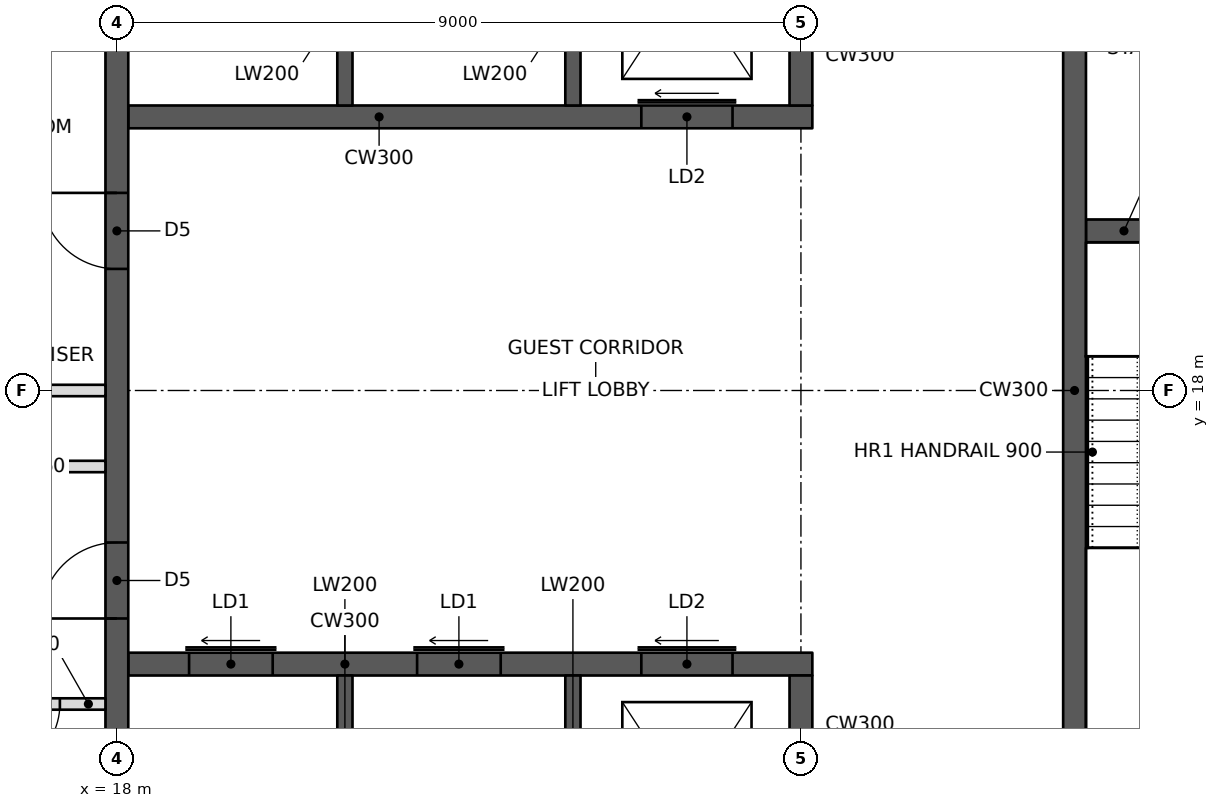
"""IFC4 building model, lengths in metres.
Left out: names, types, materials, properties, quantities, classifications, styles, units other than length and angle.
Written with IfcOpenShell. Run it as: python <this file> out.ifc"""

import sys

from ifc_helpers import new_model, si_unit, direction, frame, frame_2d, origin, place, context, subcontext, project, spatial, rectangle, extrude, element, fill, save


model = new_model("IFC4")
c1 = context("Model", 3, precision=1e-05, world=origin(), true_north=direction((0.0, 1.0)))
c2 = subcontext(c1, "Body", "Model", "MODEL_VIEW")
j1 = project(units=[si_unit("LENGTHUNIT", "METRE"), si_unit("PLANEANGLEUNIT", "RADIAN")], contexts=[c1])
p1 = place(None, origin())
s1 = spatial("IfcSite", under=j1, at=p1, CompositionType="ELEMENT")
p2 = place(p1, origin())
s2 = spatial("IfcBuilding", under=s1, at=p2, CompositionType="ELEMENT")
p3 = place(p2, frame((0.0, 0.0, 51.8)))
s3 = spatial("IfcBuildingStorey", under=s2, at=p3, CompositionType="ELEMENT", Elevation=51.8)
p4 = place(p3, frame((18.0, 11.4, 0.0), z_axis=(0.0, 0.0, 1.0), x_axis=(0.0, 1.0, 0.0)))
e1 = element("IfcWall", 1, at=p4, inside=s3, PredefinedType="SHEAR", context=c2, shape_type="SweptSolid", body=[
    extrude(rectangle(XDim=13.2, YDim=0.3, at=frame_2d((6.6, 0.0))), origin(), (0.0, 0.0, 1.0), 3.4),
])
p5 = place(p4, frame((3.6, 0.0, 0.0)))
e2 = element("IfcOpeningElement", 2, at=p5, cuts=e1, PredefinedType="OPENING", context=c2, shape_type="SweptSolid", body=[
    extrude(rectangle(XDim=1.0, YDim=2.1, at=frame_2d((0.5, 1.05))), frame((0.0, 0.16, 0.0), z_axis=(0.0, -1.0, 0.0), x_axis=(1.0, 0.0, 0.0)), (0.0, 0.0, 1.0), 0.32),
])
p6 = place(p4, frame((8.2, 0.0, 0.0)))
e3 = element("IfcOpeningElement", 3, at=p6, cuts=e1, PredefinedType="OPENING", context=c2, shape_type="SweptSolid", body=[
    extrude(rectangle(XDim=1.0, YDim=2.1, at=frame_2d((0.5, 1.05))), frame((0.0, 0.16, 0.0), z_axis=(0.0, -1.0, 0.0), x_axis=(1.0, 0.0, 0.0)), (0.0, 0.0, 1.0), 0.32),
])
p7 = place(p3, frame((14.55, 18.0, 0.0), z_axis=(0.0, 0.0, 1.0), x_axis=(1.0, 0.0, 0.0)))
e4 = element("IfcWall", 4, at=p7, inside=s3, PredefinedType="PARTITIONING", context=c2, shape_type="SweptSolid", body=[
    extrude(rectangle(XDim=3.3, YDim=0.15, at=frame_2d((1.65, 0.0))), origin(), (0.0, 0.0, 1.0), 3.2),
])
p8 = place(p3, frame((18.15, 14.4, 0.0), z_axis=(0.0, 0.0, 1.0), x_axis=(1.0, 0.0, 0.0)))
e5 = element("IfcWall", 5, at=p8, inside=s3, PredefinedType="SHEAR", context=c2, shape_type="SweptSolid", body=[
    extrude(rectangle(XDim=9.0, YDim=0.3, at=frame_2d((4.5, 0.0))), origin(), (0.0, 0.0, 1.0), 3.4),
])
p9 = place(p8, frame((0.8, 0.0, 0.0)))
e6 = element("IfcOpeningElement", 6, at=p9, cuts=e5, PredefinedType="OPENING", context=c2, shape_type="SweptSolid", body=[
    extrude(rectangle(XDim=1.1, YDim=2.1, at=frame_2d((0.55, 1.05))), frame((0.0, 0.16, 0.0), z_axis=(0.0, -1.0, 0.0), x_axis=(1.0, 0.0, 0.0)), (0.0, 0.0, 1.0), 0.32),
])
p10 = place(p8, frame((3.8, 0.0, 0.0)))
e7 = element("IfcOpeningElement", 7, at=p10, cuts=e5, PredefinedType="OPENING", context=c2, shape_type="SweptSolid", body=[
    extrude(rectangle(XDim=1.1, YDim=2.1, at=frame_2d((0.55, 1.05))), frame((0.0, 0.16, 0.0), z_axis=(0.0, -1.0, 0.0), x_axis=(1.0, 0.0, 0.0)), (0.0, 0.0, 1.0), 0.32),
])
p11 = place(p8, frame((6.75, 0.0, 0.0)))
e8 = element("IfcOpeningElement", 8, at=p11, cuts=e5, PredefinedType="OPENING", context=c2, shape_type="SweptSolid", body=[
    extrude(rectangle(XDim=1.2, YDim=2.1, at=frame_2d((0.6, 1.05))), frame((0.0, 0.16, 0.0), z_axis=(0.0, -1.0, 0.0), x_axis=(1.0, 0.0, 0.0)), (0.0, 0.0, 1.0), 0.32),
])
p12 = place(p3, frame((27.0, 11.4, 0.0), z_axis=(0.0, 0.0, 1.0), x_axis=(0.0, 1.0, 0.0)))
e9 = element("IfcWall", 9, at=p12, inside=s3, PredefinedType="SHEAR", context=c2, shape_type="SweptSolid", body=[
    extrude(rectangle(XDim=2.85, YDim=0.3, at=frame_2d((1.425, 0.0))), origin(), (0.0, 0.0, 1.0), 3.4),
])
for number, where, z_axis, x_axis in (
    (10, (21.0, 11.4, 0.0), (0.0, 0.0, 1.0), (0.0, 1.0, 0.0)),
    (11, (24.0, 11.4, 0.0), (0.0, 0.0, 1.0), (0.0, 1.0, 0.0)),
):
    element("IfcWall", number, at=place(p3, frame(where, z_axis=z_axis, x_axis=x_axis)), inside=s3, PredefinedType="SHEAR", context=c2, shape_type="SweptSolid", body=[
        extrude(rectangle(XDim=2.85, YDim=0.2, at=frame_2d((1.425, 0.0))), origin(), (0.0, 0.0, 1.0), 3.4),
    ])
p13 = place(p3, frame((18.15, 21.6, 0.0), z_axis=(0.0, 0.0, 1.0), x_axis=(1.0, 0.0, 0.0)))
e12 = element("IfcWall", 12, at=p13, inside=s3, PredefinedType="SHEAR", context=c2, shape_type="SweptSolid", body=[
    extrude(rectangle(XDim=9.0, YDim=0.3, at=frame_2d((4.5, 0.0))), origin(), (0.0, 0.0, 1.0), 3.4),
])
p14 = place(p13, frame((6.75, 0.0, 0.0)))
e13 = element("IfcOpeningElement", 13, at=p14, cuts=e12, PredefinedType="OPENING", context=c2, shape_type="SweptSolid", body=[
    extrude(rectangle(XDim=1.2, YDim=2.1, at=frame_2d((0.6, 1.05))), frame((0.0, 0.16, 0.0), z_axis=(0.0, -1.0, 0.0), x_axis=(1.0, 0.0, 0.0)), (0.0, 0.0, 1.0), 0.32),
])
p15 = place(p3, frame((27.0, 21.75, 0.0), z_axis=(0.0, 0.0, 1.0), x_axis=(0.0, 1.0, 0.0)))
e14 = element("IfcWall", 14, at=p15, inside=s3, PredefinedType="SHEAR", context=c2, shape_type="SweptSolid", body=[
    extrude(rectangle(XDim=2.85, YDim=0.3, at=frame_2d((1.425, 0.0))), origin(), (0.0, 0.0, 1.0), 3.4),
])
for number, where, z_axis, x_axis in (
    (15, (21.0, 21.75, 0.0), (0.0, 0.0, 1.0), (0.0, 1.0, 0.0)),
    (16, (24.0, 21.75, 0.0), (0.0, 0.0, 1.0), (0.0, 1.0, 0.0)),
):
    element("IfcWall", number, at=place(p3, frame(where, z_axis=z_axis, x_axis=x_axis)), inside=s3, PredefinedType="SHEAR", context=c2, shape_type="SweptSolid", body=[
        extrude(rectangle(XDim=2.85, YDim=0.2, at=frame_2d((1.425, 0.0))), origin(), (0.0, 0.0, 1.0), 3.4),
    ])
p16 = place(p3, frame((30.6, 11.4, 0.0), z_axis=(0.0, 0.0, 1.0), x_axis=(0.0, 1.0, 0.0)))
e17 = element("IfcWall", 17, at=p16, inside=s3, PredefinedType="SHEAR", context=c2, shape_type="SweptSolid", body=[
    extrude(rectangle(XDim=13.2, YDim=0.3, at=frame_2d((6.6, 0.0))), origin(), (0.0, 0.0, 1.0), 3.4),
])
p17 = place(p3, frame((30.75, 20.1, 0.0), z_axis=(0.0, 0.0, 1.0), x_axis=(1.0, 0.0, 0.0)))
e18 = element("IfcWall", 18, at=p17, inside=s3, PredefinedType="SHEAR", context=c2, shape_type="SweptSolid", body=[
    extrude(rectangle(XDim=2.85, YDim=0.3, at=frame_2d((1.425, 0.0))), origin(), (0.0, 0.0, 1.0), 3.4),
])
p18 = place(p17, frame((1.15, 0.0, 0.0)))
e19 = element("IfcOpeningElement", 19, at=p18, cuts=e18, PredefinedType="OPENING", context=c2, shape_type="SweptSolid", body=[
    extrude(rectangle(XDim=1.0, YDim=2.1, at=frame_2d((0.5, 1.05))), frame((0.0, 0.16, 0.0), z_axis=(0.0, -1.0, 0.0), x_axis=(1.0, 0.0, 0.0)), (0.0, 0.0, 1.0), 0.32),
])
p19 = place(p3, frame((14.55, 17.0, 0.0), z_axis=(0.0, 0.0, 1.0), x_axis=(1.0, 0.0, 0.0)))
e20 = element("IfcWall", 20, at=p19, inside=s3, PredefinedType="PARTITIONING", context=c2, shape_type="SweptSolid", body=[
    extrude(rectangle(XDim=3.3, YDim=0.15, at=frame_2d((1.65, 0.0))), origin(), (0.0, 0.0, 1.0), 3.2),
])
p20 = place(p19, frame((0.3, 0.0, 0.0)))
e21 = element("IfcOpeningElement", 21, at=p20, cuts=e20, PredefinedType="OPENING", context=c2, shape_type="SweptSolid", body=[
    extrude(rectangle(XDim=1.0, YDim=2.1, at=frame_2d((0.5, 1.05))), frame((0.0, 0.085, 0.0), z_axis=(0.0, -1.0, 0.0), x_axis=(1.0, 0.0, 0.0)), (0.0, 0.0, 1.0), 0.17),
])
p21 = place(p3, frame((14.55, 13.875, 0.0), z_axis=(0.0, 0.0, 1.0), x_axis=(1.0, 0.0, 0.0)))
e22 = element("IfcWall", 22, at=p21, inside=s3, PredefinedType="PARTITIONING", context=c2, shape_type="SweptSolid", body=[
    extrude(rectangle(XDim=3.3, YDim=0.15, at=frame_2d((1.65, 0.0))), origin(), (0.0, 0.0, 1.0), 3.2),
])
p22 = place(p21, frame((0.2, 0.0, 0.0)))
e23 = element("IfcOpeningElement", 23, at=p22, cuts=e22, PredefinedType="OPENING", context=c2, shape_type="SweptSolid", body=[
    extrude(rectangle(XDim=0.9, YDim=2.1, at=frame_2d((0.45, 1.05))), frame((0.0, 0.085, 0.0), z_axis=(0.0, -1.0, 0.0), x_axis=(1.0, 0.0, 0.0)), (0.0, 0.0, 1.0), 0.17),
])
p23 = place(p21, frame((1.8, 0.0, 0.0)))
e24 = element("IfcOpeningElement", 24, at=p23, cuts=e22, PredefinedType="OPENING", context=c2, shape_type="SweptSolid", body=[
    extrude(rectangle(XDim=0.9, YDim=2.1, at=frame_2d((0.45, 1.05))), frame((0.0, 0.085, 0.0), z_axis=(0.0, -1.0, 0.0), x_axis=(1.0, 0.0, 0.0)), (0.0, 0.0, 1.0), 0.17),
])
p24 = place(p23, frame((0.9, 0.0, 0.0), z_axis=(0.0, 0.0, 1.0), x_axis=(-1.0, 0.0, 0.0)))
e25 = element("IfcDoor", 25, at=p24, inside=s3, OperationType="SINGLE_SWING_RIGHT", PredefinedType="DOOR", context=c2, shape_type="SweptSolid", body=[
    extrude(rectangle(XDim=0.9, YDim=2.1, at=frame_2d((0.45, 1.05))), frame((0.0, 0.025, 0.0), z_axis=(0.0, -1.0, 0.0), x_axis=(1.0, 0.0, 0.0)), (0.0, 0.0, 1.0), 0.05),
])
fill(e24, e25)
p25 = place(p5, origin())
e26 = element("IfcDoor", 26, at=p25, inside=s3, OperationType="SINGLE_SWING_LEFT", PredefinedType="DOOR", context=c2, shape_type="SweptSolid", body=[
    extrude(rectangle(XDim=1.0, YDim=2.1, at=frame_2d((0.5, 1.05))), frame((0.0, 0.025, 0.0), z_axis=(0.0, -1.0, 0.0), x_axis=(1.0, 0.0, 0.0)), (0.0, 0.0, 1.0), 0.05),
])
fill(e2, e26)
p26 = place(p6, origin())
e27 = element("IfcDoor", 27, at=p26, inside=s3, OperationType="SINGLE_SWING_RIGHT", PredefinedType="DOOR", context=c2, shape_type="SweptSolid", body=[
    extrude(rectangle(XDim=1.0, YDim=2.1, at=frame_2d((0.5, 1.05))), frame((0.0, 0.025, 0.0), z_axis=(0.0, -1.0, 0.0), x_axis=(1.0, 0.0, 0.0)), (0.0, 0.0, 1.0), 0.05),
])
fill(e3, e27)
p27 = place(p9, origin())
e28 = element("IfcDoor", 28, at=p27, inside=s3, OperationType="SLIDING_TO_LEFT", PredefinedType="DOOR", context=c2, shape_type="SweptSolid", body=[
    extrude(rectangle(XDim=1.1, YDim=2.1, at=frame_2d((0.55, 1.05))), frame((0.0, 0.025, 0.0), z_axis=(0.0, -1.0, 0.0), x_axis=(1.0, 0.0, 0.0)), (0.0, 0.0, 1.0), 0.05),
])
fill(e6, e28)
p28 = place(p10, origin())
e29 = element("IfcDoor", 29, at=p28, inside=s3, OperationType="SLIDING_TO_LEFT", PredefinedType="DOOR", context=c2, shape_type="SweptSolid", body=[
    extrude(rectangle(XDim=1.1, YDim=2.1, at=frame_2d((0.55, 1.05))), frame((0.0, 0.025, 0.0), z_axis=(0.0, -1.0, 0.0), x_axis=(1.0, 0.0, 0.0)), (0.0, 0.0, 1.0), 0.05),
])
fill(e7, e29)
p29 = place(p11, origin())
e30 = element("IfcDoor", 30, at=p29, inside=s3, OperationType="SLIDING_TO_LEFT", PredefinedType="DOOR", context=c2, shape_type="SweptSolid", body=[
    extrude(rectangle(XDim=1.2, YDim=2.1, at=frame_2d((0.6, 1.05))), frame((0.0, 0.025, 0.0), z_axis=(0.0, -1.0, 0.0), x_axis=(1.0, 0.0, 0.0)), (0.0, 0.0, 1.0), 0.05),
])
fill(e8, e30)
p30 = place(p14, origin())
e31 = element("IfcDoor", 31, at=p30, inside=s3, OperationType="SLIDING_TO_LEFT", PredefinedType="DOOR", context=c2, shape_type="SweptSolid", body=[
    extrude(rectangle(XDim=1.2, YDim=2.1, at=frame_2d((0.6, 1.05))), frame((0.0, 0.025, 0.0), z_axis=(0.0, -1.0, 0.0), x_axis=(1.0, 0.0, 0.0)), (0.0, 0.0, 1.0), 0.05),
])
fill(e13, e31)
save(model, sys.argv[1])
